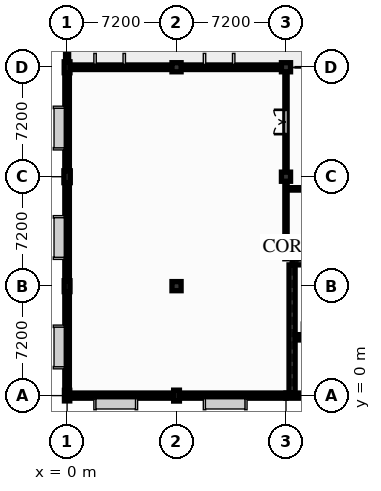
"""IFC4 building model, lengths in metres.
Left out: names, types, materials, properties, quantities, classifications, styles, units other than length and angle.
Written with IfcOpenShell. Run it as: python <this file> out.ifc"""

import sys

from ifc_helpers import new_model, si_unit, direction, frame, frame_2d, origin, origin_with_axes, origin_2d, place, context, subcontext, project, spatial, rectangle, extrude, element, fill, save


model = new_model("IFC4")
c1 = context("Model", 3, precision=1e-05, world=origin(), true_north=direction((0.0, 1.0)))
c2 = subcontext(c1, "Body", "Model", "MODEL_VIEW")
j1 = project(units=[si_unit("LENGTHUNIT", "METRE"), si_unit("PLANEANGLEUNIT", "RADIAN")], contexts=[c1])
p1 = place(None, origin())
s1 = spatial("IfcSite", under=j1, at=p1, CompositionType="ELEMENT")
p2 = place(p1, origin())
s2 = spatial("IfcBuilding", under=s1, at=p2, CompositionType="ELEMENT")
p3 = place(p2, frame((0.0, 0.0, 8.94)))
s3 = spatial("IfcBuildingStorey", under=s2, at=p3, CompositionType="ELEMENT", Elevation=8.94)
p4 = place(p3, frame((0.0, 0.0, 0.0), z_axis=(0.0, 0.0, 1.0), x_axis=(0.0, 1.0, 0.0)))
e1 = element("IfcColumn", 1, at=p4, inside=s3, PredefinedType="PILASTER", context=c2, shape_type="SweptSolid", body=[
    extrude(rectangle(XDim=0.35, YDim=0.7, at=origin_2d()), origin(), (0.0, 0.0, 1.0), 3.84),
])
p5 = place(p3, frame((0.0, 7.2, 0.0), z_axis=(0.0, 0.0, 1.0), x_axis=(1.0, 0.0, 0.0)))
e2 = element("IfcColumn", 2, at=p5, inside=s3, PredefinedType="PILASTER", context=c2, shape_type="SweptSolid", body=[
    extrude(rectangle(XDim=0.38, YDim=0.72, at=origin_2d()), origin(), (0.0, 0.0, 1.0), 3.84),
])
p6 = place(p3, frame((0.0, 14.4, 0.0), z_axis=(0.0, 0.0, 1.0), x_axis=(1.0, 0.0, 0.0)))
e3 = element("IfcColumn", 3, at=p6, inside=s3, PredefinedType="PILASTER", context=c2, shape_type="SweptSolid", body=[
    extrude(rectangle(XDim=0.42, YDim=0.78, at=origin_2d()), origin(), (0.0, 0.0, 1.0), 3.84),
])
for number, where, z_axis, x_axis in (
    (4, (0.0, 21.6, 0.0), (0.0, 0.0, 1.0), (1.0, 0.0, 0.0)),
    (5, (7.2, 0.0, 0.0), (0.0, 0.0, 1.0), (0.0, 1.0, 0.0)),
):
    element("IfcColumn", number, at=place(p3, frame(where, z_axis=z_axis, x_axis=x_axis)), inside=s3, PredefinedType="PILASTER", context=c2, shape_type="SweptSolid", body=[
        extrude(rectangle(XDim=0.38, YDim=0.72, at=origin_2d()), origin(), (0.0, 0.0, 1.0), 3.84),
    ])
for number, where, z_axis, x_axis in (
    (6, (7.2, 7.2, 0.0), (0.0, 0.0, 1.0), (1.0, 0.0, 0.0)),
    (7, (7.2, 21.6, 0.0), (0.0, 0.0, 1.0), (1.0, 0.0, 0.0)),
    (8, (14.4, 14.4, 0.0), (0.0, 0.0, 1.0), (1.0, 0.0, 0.0)),
    (9, (14.4, 21.6, 0.0), (0.0, 0.0, 1.0), (1.0, 0.0, 0.0)),
):
    element("IfcColumn", number, at=place(p3, frame(where, z_axis=z_axis, x_axis=x_axis)), inside=s3, PredefinedType="COLUMN", context=c2, shape_type="SweptSolid", body=[
        extrude(rectangle(XDim=0.6, YDim=0.6, at=origin_2d()), origin(), (0.0, 0.0, 1.0), 3.84),
    ])
p7 = place(p3, origin_with_axes())
e10 = element("IfcWall", 10, at=p7, inside=s3, PredefinedType="SOLIDWALL", context=c2, shape_type="SweptSolid", body=[
    extrude(rectangle(XDim=7.2, YDim=0.34, at=frame_2d((3.6, 0.0))), origin(), (0.0, 0.0, 1.0), 3.53),
])
p8 = place(p7, frame((2.0, 0.0, 0.415)))
e11 = element("IfcOpeningElement", 11, at=p8, cuts=e10, PredefinedType="OPENING", context=c2, shape_type="SweptSolid", body=[
    extrude(rectangle(XDim=2.4, YDim=2.4, at=frame_2d((1.2, 1.2))), frame((0.0, 0.18, 0.0), z_axis=(0.0, -1.0, 0.0), x_axis=(1.0, 0.0, 0.0)), (0.0, 0.0, 1.0), 0.36),
])
p9 = place(p3, frame((7.2, 0.0, 0.0), z_axis=(0.0, 0.0, 1.0), x_axis=(1.0, 0.0, 0.0)))
e12 = element("IfcWall", 12, at=p9, inside=s3, PredefinedType="SOLIDWALL", context=c2, shape_type="SweptSolid", body=[
    extrude(rectangle(XDim=7.2, YDim=0.34, at=frame_2d((3.6, 0.0))), origin(), (0.0, 0.0, 1.0), 3.53),
])
p10 = place(p9, frame((2.0, 0.0, 0.85)))
e13 = element("IfcOpeningElement", 13, at=p10, cuts=e12, PredefinedType="OPENING", context=c2, shape_type="SweptSolid", body=[
    extrude(rectangle(XDim=2.4, YDim=2.4, at=frame_2d((1.2, 1.2))), frame((0.0, 0.18, 0.0), z_axis=(0.0, -1.0, 0.0), x_axis=(1.0, 0.0, 0.0)), (0.0, 0.0, 1.0), 0.36),
])
p11 = place(p3, frame((14.4, 0.0, 0.0), z_axis=(0.0, 0.0, 1.0), x_axis=(1.0, 0.0, 0.0)))
e14 = element("IfcWall", 14, at=p11, inside=s3, PredefinedType="SOLIDWALL", context=c2, shape_type="SweptSolid", body=[
    extrude(rectangle(XDim=7.2, YDim=0.34, at=frame_2d((3.6, 0.0))), origin(), (0.0, 0.0, 1.0), 3.53),
])
p12 = place(p11, frame((5.2, 0.0, 1.05)))
e15 = element("IfcOpeningElement", 15, at=p12, cuts=e14, PredefinedType="OPENING", context=c2, shape_type="SweptSolid", body=[
    extrude(rectangle(XDim=1.05, YDim=1.75, at=frame_2d((0.525, 0.875))), frame((0.0, 0.18, 0.0), z_axis=(0.0, -1.0, 0.0), x_axis=(1.0, 0.0, 0.0)), (0.0, 0.0, 1.0), 0.36),
])
p13 = place(p3, frame((0.0, 0.0, 0.0), z_axis=(0.0, 0.0, 1.0), x_axis=(0.0, 1.0, 0.0)))
e16 = element("IfcWall", 16, at=p13, inside=s3, PredefinedType="SOLIDWALL", context=c2, shape_type="SweptSolid", body=[
    extrude(rectangle(XDim=7.2, YDim=0.3, at=frame_2d((3.6, 0.0))), origin(), (0.0, 0.0, 1.0), 2.855),
])
p14 = place(p13, frame((2.0, 0.0, 0.335)))
e17 = element("IfcOpeningElement", 17, at=p14, cuts=e16, PredefinedType="OPENING", context=c2, shape_type="SweptSolid", body=[
    extrude(rectangle(XDim=2.4, YDim=2.4, at=frame_2d((1.2, 1.2))), frame((0.0, 0.16, 0.0), z_axis=(0.0, -1.0, 0.0), x_axis=(1.0, 0.0, 0.0)), (0.0, 0.0, 1.0), 0.32),
])
p15 = place(p3, frame((0.0, 7.2, 0.0), z_axis=(0.0, 0.0, 1.0), x_axis=(0.0, 1.0, 0.0)))
e18 = element("IfcWall", 18, at=p15, inside=s3, PredefinedType="SOLIDWALL", context=c2, shape_type="SweptSolid", body=[
    extrude(rectangle(XDim=7.2, YDim=0.3, at=frame_2d((3.6, 0.0))), origin(), (0.0, 0.0, 1.0), 2.855),
])
p16 = place(p15, frame((2.0, 0.0, 0.335)))
e19 = element("IfcOpeningElement", 19, at=p16, cuts=e18, PredefinedType="OPENING", context=c2, shape_type="SweptSolid", body=[
    extrude(rectangle(XDim=2.4, YDim=2.4, at=frame_2d((1.2, 1.2))), frame((0.0, 0.16, 0.0), z_axis=(0.0, -1.0, 0.0), x_axis=(1.0, 0.0, 0.0)), (0.0, 0.0, 1.0), 0.32),
])
p17 = place(p3, frame((0.0, 14.4, 0.0), z_axis=(0.0, 0.0, 1.0), x_axis=(0.0, 1.0, 0.0)))
e20 = element("IfcWall", 20, at=p17, inside=s3, PredefinedType="SOLIDWALL", context=c2, shape_type="SweptSolid", body=[
    extrude(rectangle(XDim=7.2, YDim=0.3, at=frame_2d((3.6, 0.0))), origin(), (0.0, 0.0, 1.0), 2.855),
])
p18 = place(p17, frame((2.0, 0.0, 0.335)))
e21 = element("IfcOpeningElement", 21, at=p18, cuts=e20, PredefinedType="OPENING", context=c2, shape_type="SweptSolid", body=[
    extrude(rectangle(XDim=2.4, YDim=2.4, at=frame_2d((1.2, 1.2))), frame((0.0, 0.16, 0.0), z_axis=(0.0, -1.0, 0.0), x_axis=(1.0, 0.0, 0.0)), (0.0, 0.0, 1.0), 0.32),
])
p19 = place(p3, frame((0.0, 21.6, 0.0), z_axis=(0.0, 0.0, 1.0), x_axis=(1.0, 0.0, 0.0)))
e22 = element("IfcWall", 22, at=p19, inside=s3, PredefinedType="SOLIDWALL", context=c2, shape_type="SweptSolid", body=[
    extrude(rectangle(XDim=7.2, YDim=0.3, at=frame_2d((3.6, 0.0))), origin(), (0.0, 0.0, 1.0), 2.855),
])
p20 = place(p19, frame((2.0, 0.0, 0.685)))
e23 = element("IfcOpeningElement", 23, at=p20, cuts=e22, PredefinedType="OPENING", context=c2, shape_type="SweptSolid", body=[
    extrude(rectangle(XDim=1.6, YDim=2.05, at=frame_2d((0.8, 1.025))), frame((0.0, 0.16, 0.0), z_axis=(0.0, -1.0, 0.0), x_axis=(1.0, 0.0, 0.0)), (0.0, 0.0, 1.0), 0.32),
])
p21 = place(p3, frame((7.2, 21.6, 0.0), z_axis=(0.0, 0.0, 1.0), x_axis=(1.0, 0.0, 0.0)))
e24 = element("IfcWall", 24, at=p21, inside=s3, PredefinedType="SOLIDWALL", context=c2, shape_type="SweptSolid", body=[
    extrude(rectangle(XDim=7.2, YDim=0.3, at=frame_2d((3.6, 0.0))), origin(), (0.0, 0.0, 1.0), 2.855),
])
p22 = place(p21, frame((2.0, 0.0, 0.685)))
e25 = element("IfcOpeningElement", 25, at=p22, cuts=e24, PredefinedType="OPENING", context=c2, shape_type="SweptSolid", body=[
    extrude(rectangle(XDim=1.6, YDim=2.05, at=frame_2d((0.8, 1.025))), frame((0.0, 0.16, 0.0), z_axis=(0.0, -1.0, 0.0), x_axis=(1.0, 0.0, 0.0)), (0.0, 0.0, 1.0), 0.32),
])
p23 = place(p3, frame((0.0, 28.6, 0.0), z_axis=(0.0, 0.0, 1.0), x_axis=(0.0, -1.0, 0.0)))
e26 = element("IfcWall", 26, at=p23, inside=s3, PredefinedType="PARAPET", context=c2, shape_type="SweptSolid", body=[
    extrude(rectangle(XDim=6.8, YDim=0.2, at=frame_2d((3.4, 0.0))), origin(), (0.0, 0.0, 1.0), 0.72),
])
p24 = place(p3, frame((14.8, 8.8, 0.0), z_axis=(0.0, 0.0, 1.0), x_axis=(1.0, 0.0, 0.0)))
e27 = element("IfcWall", 27, at=p24, inside=s3, PredefinedType="SHEAR", context=c2, shape_type="SweptSolid", body=[
    extrude(rectangle(XDim=10.4, YDim=0.4, at=frame_2d((5.2, 0.0))), origin(), (0.0, 0.0, 1.0), 3.53),
])
p25 = place(p24, frame((2.4, 0.0, 0.0)))
e28 = element("IfcOpeningElement", 28, at=p25, cuts=e27, PredefinedType="OPENING", context=c2, shape_type="SweptSolid", body=[
    extrude(rectangle(XDim=1.5, YDim=2.2, at=frame_2d((0.75, 1.1))), frame((0.0, 0.21, 0.0), z_axis=(0.0, -1.0, 0.0), x_axis=(1.0, 0.0, 0.0)), (0.0, 0.0, 1.0), 0.42),
])
p26 = place(p3, frame((14.8, 0.17, 0.0), z_axis=(0.0, 0.0, 1.0), x_axis=(0.0, 1.0, 0.0)))
e29 = element("IfcWall", 29, at=p26, inside=s3, PredefinedType="SHEAR", context=c2, shape_type="SweptSolid", body=[
    extrude(rectangle(XDim=8.43, YDim=0.4, at=frame_2d((4.215, 0.0))), origin(), (0.0, 0.0, 1.0), 3.53),
])
p27 = place(p3, frame((15.0, 3.835, 0.0), z_axis=(0.0, 0.0, 1.0), x_axis=(1.0, 0.0, 0.0)))
e30 = element("IfcWall", 30, at=p27, inside=s3, PredefinedType="SHEAR", context=c2, shape_type="SweptSolid", body=[
    extrude(rectangle(XDim=10.0, YDim=0.35, at=frame_2d((5.0, 0.0))), origin(), (0.0, 0.0, 1.0), 3.53),
])
p28 = place(p27, frame((0.45, 0.0, 0.0)))
e31 = element("IfcOpeningElement", 31, at=p28, cuts=e30, PredefinedType="OPENING", context=c2, shape_type="SweptSolid", body=[
    extrude(rectangle(XDim=1.05, YDim=2.2, at=frame_2d((0.525, 1.1))), frame((0.0, 0.185, 0.0), z_axis=(0.0, -1.0, 0.0), x_axis=(1.0, 0.0, 0.0)), (0.0, 0.0, 1.0), 0.37),
])
p29 = place(p3, frame((14.4, 9.0, 0.0), z_axis=(0.0, 0.0, 1.0), x_axis=(0.0, 1.0, 0.0)))
e32 = element("IfcWall", 32, at=p29, inside=s3, PredefinedType="PARTITIONING", context=c2, shape_type="SweptSolid", body=[
    extrude(rectangle(XDim=12.6, YDim=0.15, at=frame_2d((6.3, 0.0))), origin(), (0.0, 0.0, 1.0), 2.755),
])
p30 = place(p29, frame((8.2, 0.0, 0.0)))
e33 = element("IfcOpeningElement", 33, at=p30, cuts=e32, PredefinedType="OPENING", context=c2, shape_type="SweptSolid", body=[
    extrude(rectangle(XDim=1.6, YDim=2.2, at=frame_2d((0.8, 1.1))), frame((0.0, 0.085, 0.0), z_axis=(0.0, -1.0, 0.0), x_axis=(1.0, 0.0, 0.0)), (0.0, 0.0, 1.0), 0.17),
])
p31 = place(p3, frame((14.6, 13.6, 0.0), z_axis=(0.0, 0.0, 1.0), x_axis=(1.0, 0.0, 0.0)))
e34 = element("IfcWall", 34, at=p31, inside=s3, PredefinedType="PARTITIONING", context=c2, shape_type="SweptSolid", body=[
    extrude(rectangle(XDim=21.4, YDim=0.16, at=frame_2d((10.7, 0.0))), origin(), (0.0, 0.0, 1.0), 3.53),
])
p32 = place(p31, frame((2.8, 0.0, 0.0)))
e35 = element("IfcOpeningElement", 35, at=p32, cuts=e34, PredefinedType="OPENING", context=c2, shape_type="SweptSolid", body=[
    extrude(rectangle(XDim=1.6, YDim=2.2, at=frame_2d((0.8, 1.1))), frame((0.0, 0.09, 0.0), z_axis=(0.0, -1.0, 0.0), x_axis=(1.0, 0.0, 0.0)), (0.0, 0.0, 1.0), 0.18),
])
p33 = place(p8, origin())
e36 = element("IfcWindow", 36, at=p33, inside=s3, PartitioningType="SINGLE_PANEL", PredefinedType="WINDOW", context=c2, shape_type="SweptSolid", body=[
    extrude(rectangle(XDim=2.4, YDim=2.4, at=frame_2d((1.2, 1.2))), frame((0.0, 0.03, 0.0), z_axis=(0.0, -1.0, 0.0), x_axis=(1.0, 0.0, 0.0)), (0.0, 0.0, 1.0), 0.06),
])
fill(e11, e36)
p34 = place(p10, origin())
e37 = element("IfcWindow", 37, at=p34, inside=s3, PartitioningType="SINGLE_PANEL", PredefinedType="WINDOW", context=c2, shape_type="SweptSolid", body=[
    extrude(rectangle(XDim=2.4, YDim=2.4, at=frame_2d((1.2, 1.2))), frame((0.0, 0.03, 0.0), z_axis=(0.0, -1.0, 0.0), x_axis=(1.0, 0.0, 0.0)), (0.0, 0.0, 1.0), 0.06),
])
fill(e13, e37)
p35 = place(p14, origin())
e38 = element("IfcWindow", 38, at=p35, inside=s3, PartitioningType="SINGLE_PANEL", PredefinedType="WINDOW", context=c2, shape_type="SweptSolid", body=[
    extrude(rectangle(XDim=2.4, YDim=2.4, at=frame_2d((1.2, 1.2))), frame((0.0, 0.03, 0.0), z_axis=(0.0, -1.0, 0.0), x_axis=(1.0, 0.0, 0.0)), (0.0, 0.0, 1.0), 0.06),
])
fill(e17, e38)
p36 = place(p16, origin())
e39 = element("IfcWindow", 39, at=p36, inside=s3, PartitioningType="SINGLE_PANEL", PredefinedType="WINDOW", context=c2, shape_type="SweptSolid", body=[
    extrude(rectangle(XDim=2.4, YDim=2.4, at=frame_2d((1.2, 1.2))), frame((0.0, 0.03, 0.0), z_axis=(0.0, -1.0, 0.0), x_axis=(1.0, 0.0, 0.0)), (0.0, 0.0, 1.0), 0.06),
])
fill(e19, e39)
p37 = place(p18, origin())
e40 = element("IfcWindow", 40, at=p37, inside=s3, PartitioningType="SINGLE_PANEL", PredefinedType="WINDOW", context=c2, shape_type="SweptSolid", body=[
    extrude(rectangle(XDim=2.4, YDim=2.4, at=frame_2d((1.2, 1.2))), frame((0.0, 0.03, 0.0), z_axis=(0.0, -1.0, 0.0), x_axis=(1.0, 0.0, 0.0)), (0.0, 0.0, 1.0), 0.06),
])
fill(e21, e40)
p38 = place(p20, origin())
e41 = element("IfcWindow", 41, at=p38, inside=s3, PartitioningType="SINGLE_PANEL", PredefinedType="WINDOW", context=c2, shape_type="SweptSolid", body=[
    extrude(rectangle(XDim=1.6, YDim=2.05, at=frame_2d((0.8, 1.025))), frame((0.0, 0.03, 0.0), z_axis=(0.0, -1.0, 0.0), x_axis=(1.0, 0.0, 0.0)), (0.0, 0.0, 1.0), 0.06),
])
fill(e23, e41)
p39 = place(p22, origin())
e42 = element("IfcWindow", 42, at=p39, inside=s3, PartitioningType="SINGLE_PANEL", PredefinedType="WINDOW", context=c2, shape_type="SweptSolid", body=[
    extrude(rectangle(XDim=1.6, YDim=2.05, at=frame_2d((0.8, 1.025))), frame((0.0, 0.03, 0.0), z_axis=(0.0, -1.0, 0.0), x_axis=(1.0, 0.0, 0.0)), (0.0, 0.0, 1.0), 0.06),
])
fill(e25, e42)
p40 = place(p30, origin())
e43 = element("IfcDoor", 43, at=p40, inside=s3, OperationType="DOUBLE_DOOR_SINGLE_SWING", PredefinedType="DOOR", context=c2, shape_type="SweptSolid", body=[
    extrude(rectangle(XDim=1.6, YDim=2.2, at=frame_2d((0.8, 1.1))), frame((0.0, 0.025, 0.0), z_axis=(0.0, -1.0, 0.0), x_axis=(1.0, 0.0, 0.0)), (0.0, 0.0, 1.0), 0.05),
])
fill(e33, e43)
save(model, sys.argv[1])
